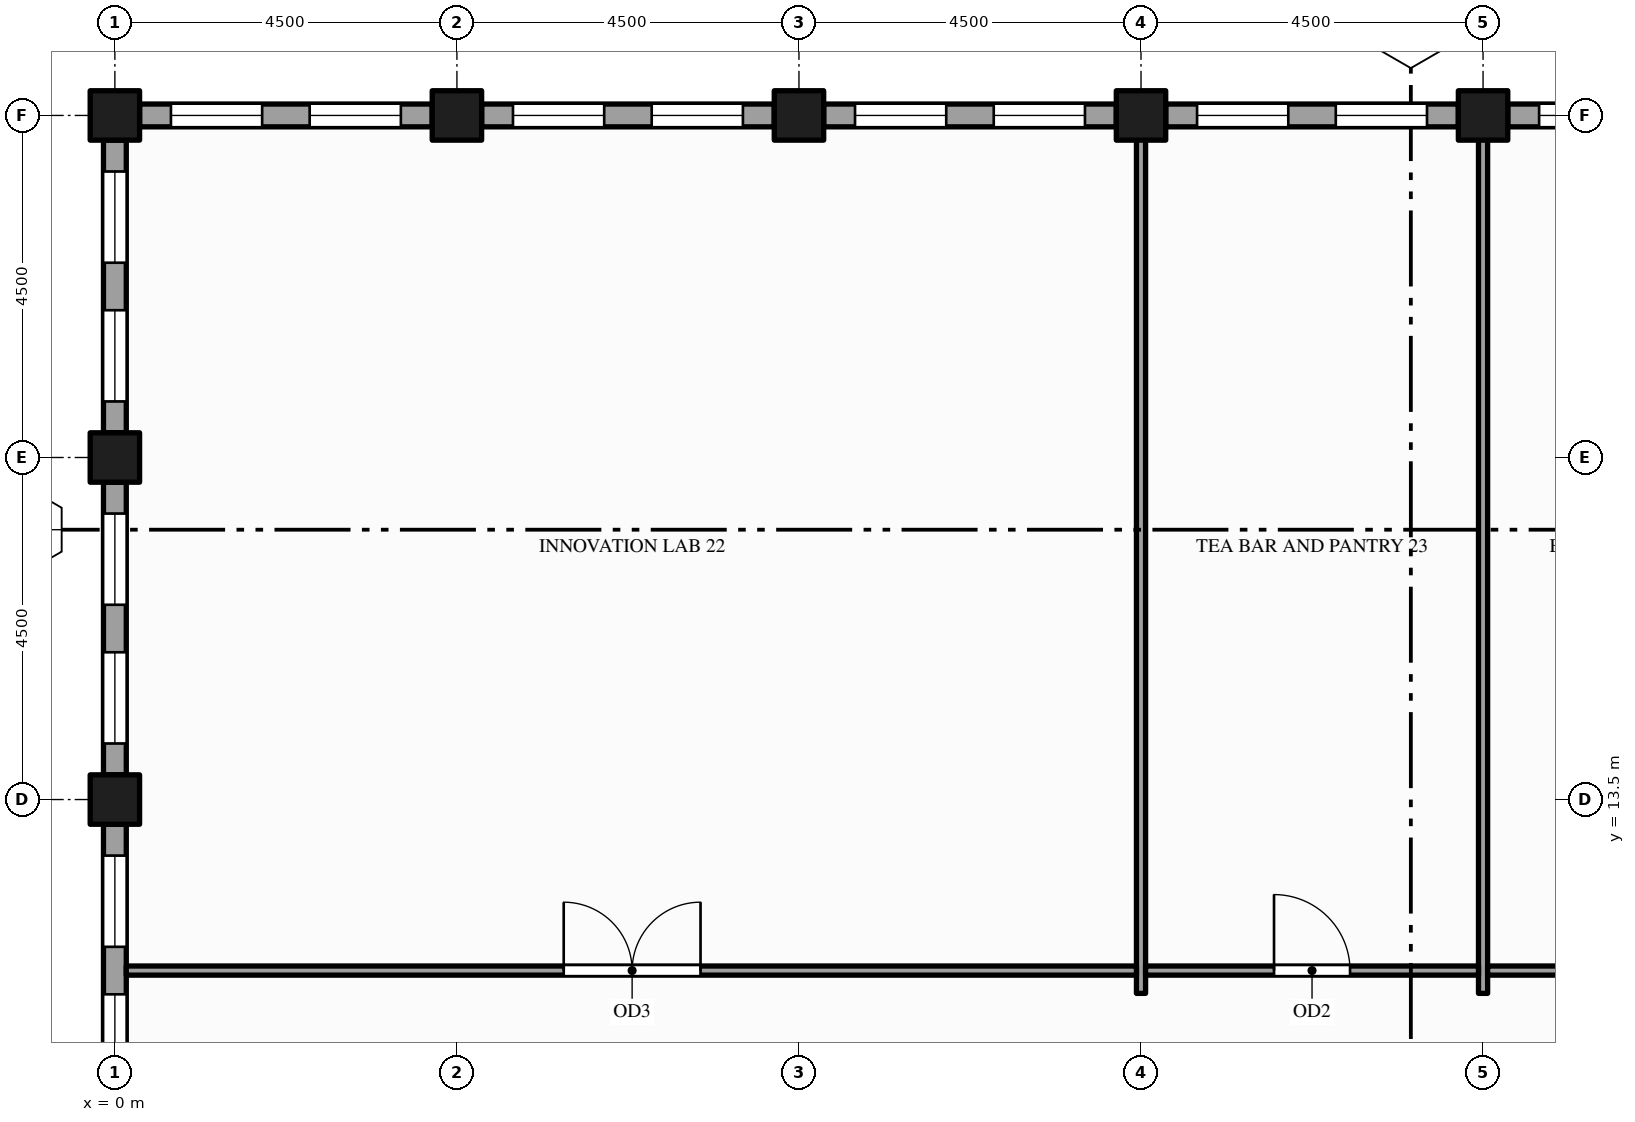
"""IFC4 building model, lengths in metres.
Left out: names, types, materials, properties, quantities, classifications, styles, units other than length and angle.
Written with IfcOpenShell. Run it as: python <this file> out.ifc"""

import sys

from ifc_helpers import new_model, si_unit, direction, frame, frame_2d, origin, origin_2d, place, context, subcontext, project, spatial, rectangle, hollow_rectangle, extrude, element, fill, save


model = new_model("IFC4")
c1 = context("Model", 3, precision=1e-05, world=origin(), true_north=direction((0.0, 1.0)))
c2 = subcontext(c1, "Body", "Model", "MODEL_VIEW")
j1 = project(units=[si_unit("LENGTHUNIT", "METRE"), si_unit("PLANEANGLEUNIT", "RADIAN")], contexts=[c1])
p1 = place(None, origin())
s1 = spatial("IfcSite", under=j1, at=p1, CompositionType="ELEMENT")
p2 = place(p1, origin())
s2 = spatial("IfcBuilding", under=s1, at=p2, CompositionType="ELEMENT")
p3 = place(p2, frame((0.0, 0.0, 293.0)))
s3 = spatial("IfcBuildingStorey", under=s2, at=p3, CompositionType="ELEMENT", Elevation=293.0)
for number, where, z_axis, x_axis in (
    (1, (0.0, 13.5, -0.15), (0.0, 0.0, 1.0), (1.0, 0.0, 0.0)),
    (2, (0.0, 18.0, -0.15), (0.0, 0.0, 1.0), (1.0, 0.0, 0.0)),
    (3, (0.0, 22.5, -0.15), (0.0, 0.0, 1.0), (1.0, 0.0, 0.0)),
    (4, (4.5, 22.5, -0.15), (0.0, 0.0, 1.0), (1.0, 0.0, 0.0)),
    (5, (9.0, 22.5, -0.15), (0.0, 0.0, 1.0), (1.0, 0.0, 0.0)),
    (6, (13.5, 22.5, -0.15), (0.0, 0.0, 1.0), (1.0, 0.0, 0.0)),
    (7, (18.0, 22.5, -0.15), (0.0, 0.0, 1.0), (1.0, 0.0, 0.0)),
):
    element("IfcColumn", number, at=place(p3, frame(where, z_axis=z_axis, x_axis=x_axis)), inside=s3, PredefinedType="COLUMN", context=c2, shape_type="SweptSolid", body=[
        extrude(hollow_rectangle(XDim=0.65, YDim=0.65, WallThickness=0.032, at=origin_2d()), origin(), (0.0, 0.0, 1.0), 3.9),
    ])
p4 = place(p3, frame((22.175, 22.5, 0.0), z_axis=(0.0, 0.0, 1.0), x_axis=(-1.0, 0.0, 0.0)))
e8 = element("IfcWall", 8, at=p4, inside=s3, PredefinedType="STANDARD", context=c2, shape_type="SweptSolid", body=[
    extrude(rectangle(XDim=3.85, YDim=0.3, at=frame_2d((1.925, 0.0))), origin(), (0.0, 0.0, 1.0), 3.062),
])
p5 = place(p4, frame((0.413, 0.0, 0.9)))
e9 = element("IfcOpeningElement", 9, at=p5, cuts=e8, PredefinedType="OPENING", context=c2, shape_type="SweptSolid", body=[
    extrude(rectangle(XDim=1.2, YDim=2.0, at=frame_2d((0.6, 1.0))), frame((0.0, 0.16, 0.0), z_axis=(0.0, -1.0, 0.0), x_axis=(1.0, 0.0, 0.0)), (0.0, 0.0, 1.0), 0.32),
])
p6 = place(p4, frame((2.238, 0.0, 0.9)))
e10 = element("IfcOpeningElement", 10, at=p6, cuts=e8, PredefinedType="OPENING", context=c2, shape_type="SweptSolid", body=[
    extrude(rectangle(XDim=1.2, YDim=2.0, at=frame_2d((0.6, 1.0))), frame((0.0, 0.16, 0.0), z_axis=(0.0, -1.0, 0.0), x_axis=(1.0, 0.0, 0.0)), (0.0, 0.0, 1.0), 0.32),
])
p7 = place(p3, frame((17.675, 22.5, 0.0), z_axis=(0.0, 0.0, 1.0), x_axis=(-1.0, 0.0, 0.0)))
e11 = element("IfcWall", 11, at=p7, inside=s3, PredefinedType="STANDARD", context=c2, shape_type="SweptSolid", body=[
    extrude(rectangle(XDim=3.85, YDim=0.3, at=frame_2d((1.925, 0.0))), origin(), (0.0, 0.0, 1.0), 3.062),
])
p8 = place(p7, frame((0.413, 0.0, 0.9)))
e12 = element("IfcOpeningElement", 12, at=p8, cuts=e11, PredefinedType="OPENING", context=c2, shape_type="SweptSolid", body=[
    extrude(rectangle(XDim=1.2, YDim=2.0, at=frame_2d((0.6, 1.0))), frame((0.0, 0.16, 0.0), z_axis=(0.0, -1.0, 0.0), x_axis=(1.0, 0.0, 0.0)), (0.0, 0.0, 1.0), 0.32),
])
p9 = place(p7, frame((2.238, 0.0, 0.9)))
e13 = element("IfcOpeningElement", 13, at=p9, cuts=e11, PredefinedType="OPENING", context=c2, shape_type="SweptSolid", body=[
    extrude(rectangle(XDim=1.2, YDim=2.0, at=frame_2d((0.6, 1.0))), frame((0.0, 0.16, 0.0), z_axis=(0.0, -1.0, 0.0), x_axis=(1.0, 0.0, 0.0)), (0.0, 0.0, 1.0), 0.32),
])
p10 = place(p3, frame((13.175, 22.5, 0.0), z_axis=(0.0, 0.0, 1.0), x_axis=(-1.0, 0.0, 0.0)))
e14 = element("IfcWall", 14, at=p10, inside=s3, PredefinedType="STANDARD", context=c2, shape_type="SweptSolid", body=[
    extrude(rectangle(XDim=3.85, YDim=0.3, at=frame_2d((1.925, 0.0))), origin(), (0.0, 0.0, 1.0), 3.062),
])
p11 = place(p10, frame((0.413, 0.0, 0.9)))
e15 = element("IfcOpeningElement", 15, at=p11, cuts=e14, PredefinedType="OPENING", context=c2, shape_type="SweptSolid", body=[
    extrude(rectangle(XDim=1.2, YDim=2.0, at=frame_2d((0.6, 1.0))), frame((0.0, 0.16, 0.0), z_axis=(0.0, -1.0, 0.0), x_axis=(1.0, 0.0, 0.0)), (0.0, 0.0, 1.0), 0.32),
])
p12 = place(p10, frame((2.238, 0.0, 0.9)))
e16 = element("IfcOpeningElement", 16, at=p12, cuts=e14, PredefinedType="OPENING", context=c2, shape_type="SweptSolid", body=[
    extrude(rectangle(XDim=1.2, YDim=2.0, at=frame_2d((0.6, 1.0))), frame((0.0, 0.16, 0.0), z_axis=(0.0, -1.0, 0.0), x_axis=(1.0, 0.0, 0.0)), (0.0, 0.0, 1.0), 0.32),
])
p13 = place(p3, frame((8.675, 22.5, 0.0), z_axis=(0.0, 0.0, 1.0), x_axis=(-1.0, 0.0, 0.0)))
e17 = element("IfcWall", 17, at=p13, inside=s3, PredefinedType="STANDARD", context=c2, shape_type="SweptSolid", body=[
    extrude(rectangle(XDim=3.85, YDim=0.3, at=frame_2d((1.925, 0.0))), origin(), (0.0, 0.0, 1.0), 3.062),
])
p14 = place(p13, frame((0.413, 0.0, 0.9)))
e18 = element("IfcOpeningElement", 18, at=p14, cuts=e17, PredefinedType="OPENING", context=c2, shape_type="SweptSolid", body=[
    extrude(rectangle(XDim=1.2, YDim=2.0, at=frame_2d((0.6, 1.0))), frame((0.0, 0.16, 0.0), z_axis=(0.0, -1.0, 0.0), x_axis=(1.0, 0.0, 0.0)), (0.0, 0.0, 1.0), 0.32),
])
p15 = place(p13, frame((2.238, 0.0, 0.9)))
e19 = element("IfcOpeningElement", 19, at=p15, cuts=e17, PredefinedType="OPENING", context=c2, shape_type="SweptSolid", body=[
    extrude(rectangle(XDim=1.2, YDim=2.0, at=frame_2d((0.6, 1.0))), frame((0.0, 0.16, 0.0), z_axis=(0.0, -1.0, 0.0), x_axis=(1.0, 0.0, 0.0)), (0.0, 0.0, 1.0), 0.32),
])
p16 = place(p3, frame((4.175, 22.5, 0.0), z_axis=(0.0, 0.0, 1.0), x_axis=(-1.0, 0.0, 0.0)))
e20 = element("IfcWall", 20, at=p16, inside=s3, PredefinedType="STANDARD", context=c2, shape_type="SweptSolid", body=[
    extrude(rectangle(XDim=3.85, YDim=0.3, at=frame_2d((1.925, 0.0))), origin(), (0.0, 0.0, 1.0), 3.062),
])
p17 = place(p16, frame((0.413, 0.0, 0.9)))
e21 = element("IfcOpeningElement", 21, at=p17, cuts=e20, PredefinedType="OPENING", context=c2, shape_type="SweptSolid", body=[
    extrude(rectangle(XDim=1.2, YDim=2.0, at=frame_2d((0.6, 1.0))), frame((0.0, 0.16, 0.0), z_axis=(0.0, -1.0, 0.0), x_axis=(1.0, 0.0, 0.0)), (0.0, 0.0, 1.0), 0.32),
])
p18 = place(p16, frame((2.238, 0.0, 0.9)))
e22 = element("IfcOpeningElement", 22, at=p18, cuts=e20, PredefinedType="OPENING", context=c2, shape_type="SweptSolid", body=[
    extrude(rectangle(XDim=1.2, YDim=2.0, at=frame_2d((0.6, 1.0))), frame((0.0, 0.16, 0.0), z_axis=(0.0, -1.0, 0.0), x_axis=(1.0, 0.0, 0.0)), (0.0, 0.0, 1.0), 0.32),
])
p19 = place(p3, frame((0.0, 22.175, 0.0), z_axis=(0.0, 0.0, 1.0), x_axis=(0.0, -1.0, 0.0)))
e23 = element("IfcWall", 23, at=p19, inside=s3, PredefinedType="STANDARD", context=c2, shape_type="SweptSolid", body=[
    extrude(rectangle(XDim=3.85, YDim=0.3, at=frame_2d((1.925, 0.0))), origin(), (0.0, 0.0, 1.0), 3.062),
])
p20 = place(p19, frame((0.413, 0.0, 0.9)))
e24 = element("IfcOpeningElement", 24, at=p20, cuts=e23, PredefinedType="OPENING", context=c2, shape_type="SweptSolid", body=[
    extrude(rectangle(XDim=1.2, YDim=2.0, at=frame_2d((0.6, 1.0))), frame((0.0, 0.16, 0.0), z_axis=(0.0, -1.0, 0.0), x_axis=(1.0, 0.0, 0.0)), (0.0, 0.0, 1.0), 0.32),
])
p21 = place(p19, frame((2.238, 0.0, 0.9)))
e25 = element("IfcOpeningElement", 25, at=p21, cuts=e23, PredefinedType="OPENING", context=c2, shape_type="SweptSolid", body=[
    extrude(rectangle(XDim=1.2, YDim=2.0, at=frame_2d((0.6, 1.0))), frame((0.0, 0.16, 0.0), z_axis=(0.0, -1.0, 0.0), x_axis=(1.0, 0.0, 0.0)), (0.0, 0.0, 1.0), 0.32),
])
p22 = place(p3, frame((0.0, 17.675, 0.0), z_axis=(0.0, 0.0, 1.0), x_axis=(0.0, -1.0, 0.0)))
e26 = element("IfcWall", 26, at=p22, inside=s3, PredefinedType="STANDARD", context=c2, shape_type="SweptSolid", body=[
    extrude(rectangle(XDim=3.85, YDim=0.3, at=frame_2d((1.925, 0.0))), origin(), (0.0, 0.0, 1.0), 3.062),
])
p23 = place(p22, frame((0.413, 0.0, 0.9)))
e27 = element("IfcOpeningElement", 27, at=p23, cuts=e26, PredefinedType="OPENING", context=c2, shape_type="SweptSolid", body=[
    extrude(rectangle(XDim=1.2, YDim=2.0, at=frame_2d((0.6, 1.0))), frame((0.0, 0.16, 0.0), z_axis=(0.0, -1.0, 0.0), x_axis=(1.0, 0.0, 0.0)), (0.0, 0.0, 1.0), 0.32),
])
p24 = place(p22, frame((2.238, 0.0, 0.9)))
e28 = element("IfcOpeningElement", 28, at=p24, cuts=e26, PredefinedType="OPENING", context=c2, shape_type="SweptSolid", body=[
    extrude(rectangle(XDim=1.2, YDim=2.0, at=frame_2d((0.6, 1.0))), frame((0.0, 0.16, 0.0), z_axis=(0.0, -1.0, 0.0), x_axis=(1.0, 0.0, 0.0)), (0.0, 0.0, 1.0), 0.32),
])
p25 = place(p3, frame((0.0, 13.175, 0.0), z_axis=(0.0, 0.0, 1.0), x_axis=(0.0, -1.0, 0.0)))
e29 = element("IfcWall", 29, at=p25, inside=s3, PredefinedType="STANDARD", context=c2, shape_type="SweptSolid", body=[
    extrude(rectangle(XDim=3.85, YDim=0.3, at=frame_2d((1.925, 0.0))), origin(), (0.0, 0.0, 1.0), 3.062),
])
p26 = place(p25, frame((0.413, 0.0, 0.9)))
e30 = element("IfcOpeningElement", 30, at=p26, cuts=e29, PredefinedType="OPENING", context=c2, shape_type="SweptSolid", body=[
    extrude(rectangle(XDim=1.2, YDim=2.0, at=frame_2d((0.6, 1.0))), frame((0.0, 0.16, 0.0), z_axis=(0.0, -1.0, 0.0), x_axis=(1.0, 0.0, 0.0)), (0.0, 0.0, 1.0), 0.32),
])
p27 = place(p25, frame((2.238, 0.0, 0.9)))
e31 = element("IfcOpeningElement", 31, at=p27, cuts=e29, PredefinedType="OPENING", context=c2, shape_type="SweptSolid", body=[
    extrude(rectangle(XDim=1.2, YDim=2.0, at=frame_2d((0.6, 1.0))), frame((0.0, 0.16, 0.0), z_axis=(0.0, -1.0, 0.0), x_axis=(1.0, 0.0, 0.0)), (0.0, 0.0, 1.0), 0.32),
])
for number, where, z_axis, x_axis in (
    (32, (13.5, 10.95, 0.0), (0.0, 0.0, 1.0), (0.0, 1.0, 0.0)),
    (33, (18.0, 10.95, 0.0), (0.0, 0.0, 1.0), (0.0, 1.0, 0.0)),
):
    element("IfcWall", number, at=place(p3, frame(where, z_axis=z_axis, x_axis=x_axis)), inside=s3, PredefinedType="PARTITIONING", context=c2, shape_type="SweptSolid", body=[
        extrude(rectangle(XDim=11.4, YDim=0.12, at=frame_2d((5.7, 0.0))), origin(), (0.0, 0.0, 1.0), 2.77),
    ])
p28 = place(p3, frame((0.15, 11.25, 0.0), z_axis=(0.0, 0.0, 1.0), x_axis=(1.0, 0.0, 0.0)))
e34 = element("IfcWall", 34, at=p28, inside=s3, PredefinedType="PARTITIONING", context=c2, shape_type="SweptSolid", body=[
    extrude(rectangle(XDim=13.29, YDim=0.12, at=frame_2d((6.645, 0.0))), origin(), (0.0, 0.0, 1.0), 2.77),
])
p29 = place(p28, frame((5.755, 0.0, 0.0)))
e35 = element("IfcOpeningElement", 35, at=p29, cuts=e34, PredefinedType="OPENING", context=c2, shape_type="SweptSolid", body=[
    extrude(rectangle(XDim=1.8, YDim=2.1, at=frame_2d((0.9, 1.05))), frame((0.0, 0.07, 0.0), z_axis=(0.0, -1.0, 0.0), x_axis=(1.0, 0.0, 0.0)), (0.0, 0.0, 1.0), 0.14),
])
p30 = place(p3, frame((13.56, 11.25, 0.0), z_axis=(0.0, 0.0, 1.0), x_axis=(1.0, 0.0, 0.0)))
e36 = element("IfcWall", 36, at=p30, inside=s3, PredefinedType="PARTITIONING", context=c2, shape_type="SweptSolid", body=[
    extrude(rectangle(XDim=4.38, YDim=0.12, at=frame_2d((2.19, 0.0))), origin(), (0.0, 0.0, 1.0), 2.77),
])
p31 = place(p30, frame((1.69, 0.0, 0.0)))
e37 = element("IfcOpeningElement", 37, at=p31, cuts=e36, PredefinedType="OPENING", context=c2, shape_type="SweptSolid", body=[
    extrude(rectangle(XDim=1.0, YDim=2.1, at=frame_2d((0.5, 1.05))), frame((0.0, 0.07, 0.0), z_axis=(0.0, -1.0, 0.0), x_axis=(1.0, 0.0, 0.0)), (0.0, 0.0, 1.0), 0.14),
])
p32 = place(p3, frame((18.06, 11.25, 0.0), z_axis=(0.0, 0.0, 1.0), x_axis=(1.0, 0.0, 0.0)))
e38 = element("IfcWall", 38, at=p32, inside=s3, PredefinedType="PARTITIONING", context=c2, shape_type="SweptSolid", body=[
    extrude(rectangle(XDim=4.38, YDim=0.12, at=frame_2d((2.19, 0.0))), origin(), (0.0, 0.0, 1.0), 2.77),
])
p33 = place(p32, frame((1.74, 0.0, 0.0)))
e39 = element("IfcOpeningElement", 39, at=p33, cuts=e38, PredefinedType="OPENING", context=c2, shape_type="SweptSolid", body=[
    extrude(rectangle(XDim=0.9, YDim=2.1, at=frame_2d((0.45, 1.05))), frame((0.0, 0.07, 0.0), z_axis=(0.0, -1.0, 0.0), x_axis=(1.0, 0.0, 0.0)), (0.0, 0.0, 1.0), 0.14),
])
p34 = place(p6, origin())
e40 = element("IfcWindow", 40, at=p34, inside=s3, PartitioningType="SINGLE_PANEL", PredefinedType="WINDOW", context=c2, shape_type="SweptSolid", body=[
    extrude(rectangle(XDim=1.2, YDim=2.0, at=frame_2d((0.6, 1.0))), frame((0.0, 0.03, 0.0), z_axis=(0.0, -1.0, 0.0), x_axis=(1.0, 0.0, 0.0)), (0.0, 0.0, 1.0), 0.06),
])
fill(e10, e40)
p35 = place(p8, origin())
e41 = element("IfcWindow", 41, at=p35, inside=s3, PartitioningType="SINGLE_PANEL", PredefinedType="WINDOW", context=c2, shape_type="SweptSolid", body=[
    extrude(rectangle(XDim=1.2, YDim=2.0, at=frame_2d((0.6, 1.0))), frame((0.0, 0.03, 0.0), z_axis=(0.0, -1.0, 0.0), x_axis=(1.0, 0.0, 0.0)), (0.0, 0.0, 1.0), 0.06),
])
fill(e12, e41)
p36 = place(p9, origin())
e42 = element("IfcWindow", 42, at=p36, inside=s3, PartitioningType="SINGLE_PANEL", PredefinedType="WINDOW", context=c2, shape_type="SweptSolid", body=[
    extrude(rectangle(XDim=1.2, YDim=2.0, at=frame_2d((0.6, 1.0))), frame((0.0, 0.03, 0.0), z_axis=(0.0, -1.0, 0.0), x_axis=(1.0, 0.0, 0.0)), (0.0, 0.0, 1.0), 0.06),
])
fill(e13, e42)
p37 = place(p11, origin())
e43 = element("IfcWindow", 43, at=p37, inside=s3, PartitioningType="SINGLE_PANEL", PredefinedType="WINDOW", context=c2, shape_type="SweptSolid", body=[
    extrude(rectangle(XDim=1.2, YDim=2.0, at=frame_2d((0.6, 1.0))), frame((0.0, 0.03, 0.0), z_axis=(0.0, -1.0, 0.0), x_axis=(1.0, 0.0, 0.0)), (0.0, 0.0, 1.0), 0.06),
])
fill(e15, e43)
p38 = place(p12, origin())
e44 = element("IfcWindow", 44, at=p38, inside=s3, PartitioningType="SINGLE_PANEL", PredefinedType="WINDOW", context=c2, shape_type="SweptSolid", body=[
    extrude(rectangle(XDim=1.2, YDim=2.0, at=frame_2d((0.6, 1.0))), frame((0.0, 0.03, 0.0), z_axis=(0.0, -1.0, 0.0), x_axis=(1.0, 0.0, 0.0)), (0.0, 0.0, 1.0), 0.06),
])
fill(e16, e44)
p39 = place(p14, origin())
e45 = element("IfcWindow", 45, at=p39, inside=s3, PartitioningType="SINGLE_PANEL", PredefinedType="WINDOW", context=c2, shape_type="SweptSolid", body=[
    extrude(rectangle(XDim=1.2, YDim=2.0, at=frame_2d((0.6, 1.0))), frame((0.0, 0.03, 0.0), z_axis=(0.0, -1.0, 0.0), x_axis=(1.0, 0.0, 0.0)), (0.0, 0.0, 1.0), 0.06),
])
fill(e18, e45)
p40 = place(p15, origin())
e46 = element("IfcWindow", 46, at=p40, inside=s3, PartitioningType="SINGLE_PANEL", PredefinedType="WINDOW", context=c2, shape_type="SweptSolid", body=[
    extrude(rectangle(XDim=1.2, YDim=2.0, at=frame_2d((0.6, 1.0))), frame((0.0, 0.03, 0.0), z_axis=(0.0, -1.0, 0.0), x_axis=(1.0, 0.0, 0.0)), (0.0, 0.0, 1.0), 0.06),
])
fill(e19, e46)
p41 = place(p17, origin())
e47 = element("IfcWindow", 47, at=p41, inside=s3, PartitioningType="SINGLE_PANEL", PredefinedType="WINDOW", context=c2, shape_type="SweptSolid", body=[
    extrude(rectangle(XDim=1.2, YDim=2.0, at=frame_2d((0.6, 1.0))), frame((0.0, 0.03, 0.0), z_axis=(0.0, -1.0, 0.0), x_axis=(1.0, 0.0, 0.0)), (0.0, 0.0, 1.0), 0.06),
])
fill(e21, e47)
p42 = place(p18, origin())
e48 = element("IfcWindow", 48, at=p42, inside=s3, PartitioningType="SINGLE_PANEL", PredefinedType="WINDOW", context=c2, shape_type="SweptSolid", body=[
    extrude(rectangle(XDim=1.2, YDim=2.0, at=frame_2d((0.6, 1.0))), frame((0.0, 0.03, 0.0), z_axis=(0.0, -1.0, 0.0), x_axis=(1.0, 0.0, 0.0)), (0.0, 0.0, 1.0), 0.06),
])
fill(e22, e48)
p43 = place(p20, origin())
e49 = element("IfcWindow", 49, at=p43, inside=s3, PartitioningType="SINGLE_PANEL", PredefinedType="WINDOW", context=c2, shape_type="SweptSolid", body=[
    extrude(rectangle(XDim=1.2, YDim=2.0, at=frame_2d((0.6, 1.0))), frame((0.0, 0.03, 0.0), z_axis=(0.0, -1.0, 0.0), x_axis=(1.0, 0.0, 0.0)), (0.0, 0.0, 1.0), 0.06),
])
fill(e24, e49)
p44 = place(p21, origin())
e50 = element("IfcWindow", 50, at=p44, inside=s3, PartitioningType="SINGLE_PANEL", PredefinedType="WINDOW", context=c2, shape_type="SweptSolid", body=[
    extrude(rectangle(XDim=1.2, YDim=2.0, at=frame_2d((0.6, 1.0))), frame((0.0, 0.03, 0.0), z_axis=(0.0, -1.0, 0.0), x_axis=(1.0, 0.0, 0.0)), (0.0, 0.0, 1.0), 0.06),
])
fill(e25, e50)
p45 = place(p23, origin())
e51 = element("IfcWindow", 51, at=p45, inside=s3, PartitioningType="SINGLE_PANEL", PredefinedType="WINDOW", context=c2, shape_type="SweptSolid", body=[
    extrude(rectangle(XDim=1.2, YDim=2.0, at=frame_2d((0.6, 1.0))), frame((0.0, 0.03, 0.0), z_axis=(0.0, -1.0, 0.0), x_axis=(1.0, 0.0, 0.0)), (0.0, 0.0, 1.0), 0.06),
])
fill(e27, e51)
p46 = place(p24, origin())
e52 = element("IfcWindow", 52, at=p46, inside=s3, PartitioningType="SINGLE_PANEL", PredefinedType="WINDOW", context=c2, shape_type="SweptSolid", body=[
    extrude(rectangle(XDim=1.2, YDim=2.0, at=frame_2d((0.6, 1.0))), frame((0.0, 0.03, 0.0), z_axis=(0.0, -1.0, 0.0), x_axis=(1.0, 0.0, 0.0)), (0.0, 0.0, 1.0), 0.06),
])
fill(e28, e52)
p47 = place(p26, origin())
e53 = element("IfcWindow", 53, at=p47, inside=s3, PartitioningType="SINGLE_PANEL", PredefinedType="WINDOW", context=c2, shape_type="SweptSolid", body=[
    extrude(rectangle(XDim=1.2, YDim=2.0, at=frame_2d((0.6, 1.0))), frame((0.0, 0.03, 0.0), z_axis=(0.0, -1.0, 0.0), x_axis=(1.0, 0.0, 0.0)), (0.0, 0.0, 1.0), 0.06),
])
fill(e30, e53)
p48 = place(p27, origin())
e54 = element("IfcWindow", 54, at=p48, inside=s3, PartitioningType="SINGLE_PANEL", PredefinedType="WINDOW", context=c2, shape_type="SweptSolid", body=[
    extrude(rectangle(XDim=1.2, YDim=2.0, at=frame_2d((0.6, 1.0))), frame((0.0, 0.03, 0.0), z_axis=(0.0, -1.0, 0.0), x_axis=(1.0, 0.0, 0.0)), (0.0, 0.0, 1.0), 0.06),
])
fill(e31, e54)
p49 = place(p29, origin())
e55 = element("IfcDoor", 55, at=p49, inside=s3, OperationType="DOUBLE_DOOR_SINGLE_SWING", PredefinedType="DOOR", context=c2, shape_type="SweptSolid", body=[
    extrude(rectangle(XDim=1.8, YDim=2.1, at=frame_2d((0.9, 1.05))), frame((0.0, 0.025, 0.0), z_axis=(0.0, -1.0, 0.0), x_axis=(1.0, 0.0, 0.0)), (0.0, 0.0, 1.0), 0.05),
])
fill(e35, e55)
p50 = place(p31, origin())
e56 = element("IfcDoor", 56, at=p50, inside=s3, OperationType="SINGLE_SWING_LEFT", PredefinedType="DOOR", context=c2, shape_type="SweptSolid", body=[
    extrude(rectangle(XDim=1.0, YDim=2.1, at=frame_2d((0.5, 1.05))), frame((0.0, 0.025, 0.0), z_axis=(0.0, -1.0, 0.0), x_axis=(1.0, 0.0, 0.0)), (0.0, 0.0, 1.0), 0.05),
])
fill(e37, e56)
save(model, sys.argv[1])
